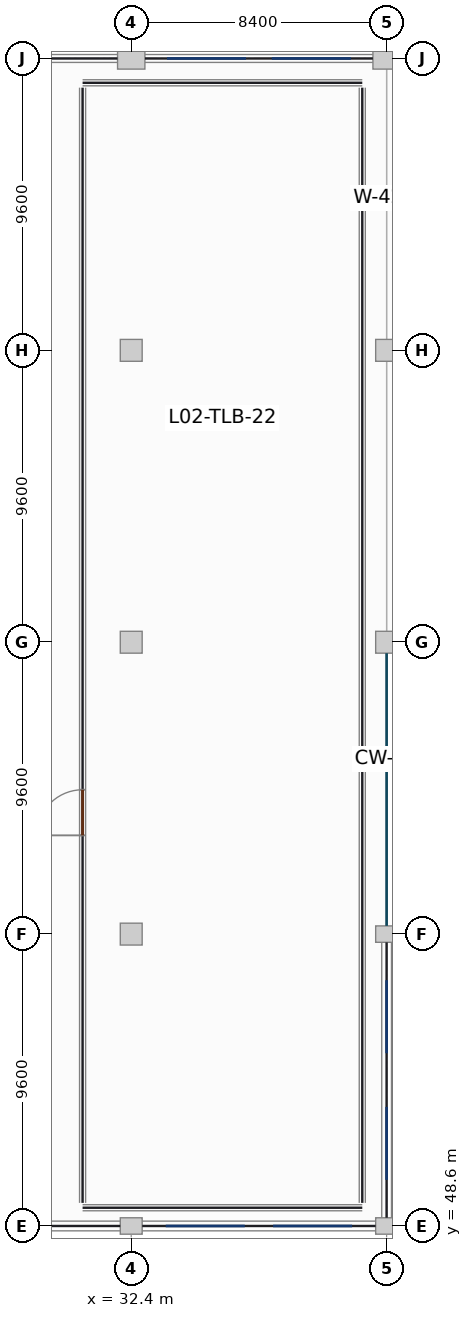
"""IFC4 building model, lengths in metres.
Left out: names, types, materials, properties, quantities, classifications, styles, units other than length and angle.
Written with IfcOpenShell. Run it as: python <this file> out.ifc"""

import sys

from ifc_helpers import new_model, si_unit, direction, frame, frame_2d, origin, origin_2d, place, context, subcontext, project, spatial, rectangle, extrude, element, fill, save


model = new_model("IFC4")
c1 = context("Model", 3, precision=1e-05, world=origin(), true_north=direction((0.0, 1.0)))
c2 = subcontext(c1, "Body", "Model", "MODEL_VIEW")
j1 = project(units=[si_unit("LENGTHUNIT", "METRE"), si_unit("PLANEANGLEUNIT", "RADIAN")], contexts=[c1])
p1 = place(None, origin())
s1 = spatial("IfcSite", under=j1, at=p1, CompositionType="ELEMENT")
p2 = place(p1, origin())
s2 = spatial("IfcBuilding", under=s1, at=p2, CompositionType="ELEMENT")
p3 = place(p2, frame((0.0, 0.0, 9.9)))
s3 = spatial("IfcBuildingStorey", under=s2, at=p3, CompositionType="ELEMENT", Elevation=9.9)
p4 = place(p3, frame((32.4, 48.6, 0.0), z_axis=(0.0, 0.0, 1.0), x_axis=(1.0, 0.0, 0.0)))
e1 = element("IfcColumn", 1, at=p4, inside=s3, PredefinedType="COLUMN", context=c2, shape_type="SweptSolid", body=[
    extrude(rectangle(XDim=0.72, YDim=0.54, at=origin_2d()), origin(), (0.0, 0.0, 1.0), 3.9),
])
for number, where, z_axis, x_axis in (
    (2, (32.4, 58.2, 0.0), (0.0, 0.0, 1.0), (1.0, 0.0, 0.0)),
    (3, (32.4, 67.8, 0.0), (0.0, 0.0, 1.0), (1.0, 0.0, 0.0)),
    (4, (32.4, 77.4, 0.0), (0.0, 0.0, 1.0), (1.0, 0.0, 0.0)),
):
    element("IfcColumn", number, at=place(p3, frame(where, z_axis=z_axis, x_axis=x_axis)), inside=s3, PredefinedType="COLUMN", context=c2, shape_type="SweptSolid", body=[
        extrude(rectangle(XDim=0.72, YDim=0.72, at=origin_2d()), origin(), (0.0, 0.0, 1.0), 3.9),
    ])
p5 = place(p3, frame((32.4, 87.0, 0.0), z_axis=(0.0, 0.0, 1.0), x_axis=(1.0, 0.0, 0.0)))
e5 = element("IfcColumn", 5, at=p5, inside=s3, PredefinedType="COLUMN", context=c2, shape_type="SweptSolid", body=[
    extrude(rectangle(XDim=0.9, YDim=0.7, at=origin_2d()), origin(), (0.0, 0.0, 1.0), 3.9),
])
for number, where, z_axis, x_axis in (
    (6, (40.8, 48.6, 0.0), (0.0, 0.0, 1.0), (1.0, 0.0, 0.0)),
    (7, (40.8, 58.2, 0.0), (0.0, 0.0, 1.0), (1.0, 0.0, 0.0)),
):
    element("IfcColumn", number, at=place(p3, frame(where, z_axis=z_axis, x_axis=x_axis)), inside=s3, PredefinedType="COLUMN", context=c2, shape_type="SweptSolid", body=[
        extrude(rectangle(XDim=0.72, YDim=0.54, at=origin_2d()), origin(), (0.0, 0.0, 1.0), 3.9),
    ])
for number, where, z_axis, x_axis in (
    (8, (40.8, 67.8, 0.0), (0.0, 0.0, 1.0), (1.0, 0.0, 0.0)),
    (9, (40.8, 77.4, 0.0), (0.0, 0.0, 1.0), (1.0, 0.0, 0.0)),
):
    element("IfcColumn", number, at=place(p3, frame(where, z_axis=z_axis, x_axis=x_axis)), inside=s3, PredefinedType="COLUMN", context=c2, shape_type="SweptSolid", body=[
        extrude(rectangle(XDim=0.72, YDim=0.72, at=origin_2d()), origin(), (0.0, 0.0, 1.0), 3.9),
    ])
p6 = place(p3, frame((40.8, 87.0, 0.0), z_axis=(0.0, 0.0, 1.0), x_axis=(1.0, 0.0, 0.0)))
e10 = element("IfcColumn", 10, at=p6, inside=s3, PredefinedType="COLUMN", context=c2, shape_type="SweptSolid", body=[
    extrude(rectangle(XDim=0.9, YDim=0.7, at=origin_2d()), origin(), (0.0, 0.0, 1.0), 3.9),
])
p7 = place(p3, frame((40.8, 48.872, 0.0), z_axis=(0.0, 0.0, 1.0), x_axis=(0.0, 1.0, 0.0)))
e11 = element("IfcWall", 11, at=p7, inside=s3, PredefinedType="SOLIDWALL", context=c2, shape_type="SweptSolid", body=[
    extrude(rectangle(XDim=9.056, YDim=0.32, at=frame_2d((4.528, 0.0))), origin(), (0.0, 0.0, 1.0), 3.08),
])
p8 = place(p7, frame((1.245, 0.0, 0.85)))
e12 = element("IfcOpeningElement", 12, at=p8, cuts=e11, PredefinedType="OPENING", context=c2, shape_type="SweptSolid", body=[
    extrude(rectangle(XDim=2.4, YDim=1.95, at=frame_2d((1.2, 0.975))), frame((0.0, 0.17, 0.0), z_axis=(0.0, -1.0, 0.0), x_axis=(1.0, 0.0, 0.0)), (0.0, 0.0, 1.0), 0.34),
])
p9 = place(p7, frame((5.411, 0.0, 0.85)))
e13 = element("IfcOpeningElement", 13, at=p9, cuts=e11, PredefinedType="OPENING", context=c2, shape_type="SweptSolid", body=[
    extrude(rectangle(XDim=2.4, YDim=1.95, at=frame_2d((1.2, 0.975))), frame((0.0, 0.17, 0.0), z_axis=(0.0, -1.0, 0.0), x_axis=(1.0, 0.0, 0.0)), (0.0, 0.0, 1.0), 0.34),
])
p10 = place(p3, frame((24.362, 48.6, 0.0), z_axis=(0.0, 0.0, 1.0), x_axis=(1.0, 0.0, 0.0)))
e14 = element("IfcWall", 14, at=p10, inside=s3, PredefinedType="SOLIDWALL", context=c2, shape_type="SweptSolid", body=[
    extrude(rectangle(XDim=7.676, YDim=0.32, at=frame_2d((3.838, 0.0))), origin(), (0.0, 0.0, 1.0), 3.08),
])
p11 = place(p10, frame((1.142, 0.0, 0.85)))
e15 = element("IfcOpeningElement", 15, at=p11, cuts=e14, PredefinedType="OPENING", context=c2, shape_type="SweptSolid", body=[
    extrude(rectangle(XDim=1.4, YDim=1.65, at=frame_2d((0.7, 0.825))), frame((0.0, 0.17, 0.0), z_axis=(0.0, -1.0, 0.0), x_axis=(1.0, 0.0, 0.0)), (0.0, 0.0, 1.0), 0.34),
])
p12 = place(p3, frame((32.762, 48.6, 0.0), z_axis=(0.0, 0.0, 1.0), x_axis=(1.0, 0.0, 0.0)))
e16 = element("IfcWall", 16, at=p12, inside=s3, PredefinedType="SOLIDWALL", context=c2, shape_type="SweptSolid", body=[
    extrude(rectangle(XDim=7.676, YDim=0.32, at=frame_2d((3.838, 0.0))), origin(), (0.0, 0.0, 1.0), 3.08),
])
p13 = place(p12, frame((0.772, 0.0, 0.85)))
e17 = element("IfcOpeningElement", 17, at=p13, cuts=e16, PredefinedType="OPENING", context=c2, shape_type="SweptSolid", body=[
    extrude(rectangle(XDim=2.6, YDim=1.95, at=frame_2d((1.3, 0.975))), frame((0.0, 0.17, 0.0), z_axis=(0.0, -1.0, 0.0), x_axis=(1.0, 0.0, 0.0)), (0.0, 0.0, 1.0), 0.34),
])
p14 = place(p12, frame((4.303, 0.0, 0.85)))
e18 = element("IfcOpeningElement", 18, at=p14, cuts=e16, PredefinedType="OPENING", context=c2, shape_type="SweptSolid", body=[
    extrude(rectangle(XDim=2.6, YDim=1.95, at=frame_2d((1.3, 0.975))), frame((0.0, 0.17, 0.0), z_axis=(0.0, -1.0, 0.0), x_axis=(1.0, 0.0, 0.0)), (0.0, 0.0, 1.0), 0.34),
])
p15 = place(p3, frame((24.452, 87.0, 0.0), z_axis=(0.0, 0.0, 1.0), x_axis=(1.0, 0.0, 0.0)))
e19 = element("IfcWall", 19, at=p15, inside=s3, PredefinedType="SOLIDWALL", context=c2, shape_type="SweptSolid", body=[
    extrude(rectangle(XDim=7.496, YDim=0.26, at=frame_2d((3.748, 0.0))), origin(), (0.0, 0.0, 1.0), 3.08),
])
p16 = place(p15, frame((0.724, 0.0, 0.85)))
e20 = element("IfcOpeningElement", 20, at=p16, cuts=e19, PredefinedType="OPENING", context=c2, shape_type="SweptSolid", body=[
    extrude(rectangle(XDim=2.6, YDim=1.95, at=frame_2d((1.3, 0.975))), frame((0.0, 0.14, 0.0), z_axis=(0.0, -1.0, 0.0), x_axis=(1.0, 0.0, 0.0)), (0.0, 0.0, 1.0), 0.28),
])
p17 = place(p3, frame((32.852, 87.0, 0.0), z_axis=(0.0, 0.0, 1.0), x_axis=(1.0, 0.0, 0.0)))
e21 = element("IfcWall", 21, at=p17, inside=s3, PredefinedType="SOLIDWALL", context=c2, shape_type="SweptSolid", body=[
    extrude(rectangle(XDim=7.496, YDim=0.26, at=frame_2d((3.748, 0.0))), origin(), (0.0, 0.0, 1.0), 3.08),
])
p18 = place(p17, frame((0.724, 0.0, 0.85)))
e22 = element("IfcOpeningElement", 22, at=p18, cuts=e21, PredefinedType="OPENING", context=c2, shape_type="SweptSolid", body=[
    extrude(rectangle(XDim=2.6, YDim=1.95, at=frame_2d((1.3, 0.975))), frame((0.0, 0.14, 0.0), z_axis=(0.0, -1.0, 0.0), x_axis=(1.0, 0.0, 0.0)), (0.0, 0.0, 1.0), 0.28),
])
p19 = place(p17, frame((4.172, 0.0, 0.85)))
e23 = element("IfcOpeningElement", 23, at=p19, cuts=e21, PredefinedType="OPENING", context=c2, shape_type="SweptSolid", body=[
    extrude(rectangle(XDim=2.6, YDim=1.95, at=frame_2d((1.3, 0.975))), frame((0.0, 0.14, 0.0), z_axis=(0.0, -1.0, 0.0), x_axis=(1.0, 0.0, 0.0)), (0.0, 0.0, 1.0), 0.28),
])
for number, where, z_axis, x_axis in (
    (24, (30.8, 49.2, 0.0), (0.0, 0.0, 1.0), (1.0, 0.0, 0.0)),
    (25, (30.8, 86.2, 0.0), (0.0, 0.0, 1.0), (1.0, 0.0, 0.0)),
):
    element("IfcWall", number, at=place(p3, frame(where, z_axis=z_axis, x_axis=x_axis)), inside=s3, PredefinedType="PARTITIONING", context=c2, shape_type="SweptSolid", body=[
        extrude(rectangle(XDim=9.2, YDim=0.2, at=frame_2d((4.6, 0.0))), origin(), (0.0, 0.0, 1.0), 2.92),
    ])
p20 = place(p3, frame((30.8, 49.36, 0.0), z_axis=(0.0, 0.0, 1.0), x_axis=(0.0, 1.0, 0.0)))
e26 = element("IfcWall", 26, at=p20, inside=s3, PredefinedType="PARTITIONING", context=c2, shape_type="SweptSolid", body=[
    extrude(rectangle(XDim=36.68, YDim=0.2, at=frame_2d((18.34, 0.0))), origin(), (0.0, 0.0, 1.0), 2.92),
])
p21 = place(p20, frame((12.088, 0.0, 0.0)))
e27 = element("IfcOpeningElement", 27, at=p21, cuts=e26, PredefinedType="OPENING", context=c2, shape_type="SweptSolid", body=[
    extrude(rectangle(XDim=1.5, YDim=2.2, at=frame_2d((0.75, 1.1))), frame((0.0, 0.11, 0.0), z_axis=(0.0, -1.0, 0.0), x_axis=(1.0, 0.0, 0.0)), (0.0, 0.0, 1.0), 0.22),
])
p22 = place(p3, frame((40.0, 49.36, 0.0), z_axis=(0.0, 0.0, 1.0), x_axis=(0.0, 1.0, 0.0)))
e28 = element("IfcWall", 28, at=p22, inside=s3, PredefinedType="PARTITIONING", context=c2, shape_type="SweptSolid", body=[
    extrude(rectangle(XDim=36.68, YDim=0.2, at=frame_2d((18.34, 0.0))), origin(), (0.0, 0.0, 1.0), 2.92),
])
p23 = place(p8, origin())
e29 = element("IfcWindow", 29, at=p23, inside=s3, PartitioningType="SINGLE_PANEL", PredefinedType="WINDOW", context=c2, shape_type="SweptSolid", body=[
    extrude(rectangle(XDim=2.4, YDim=1.95, at=frame_2d((1.2, 0.975))), frame((0.0, 0.03, 0.0), z_axis=(0.0, -1.0, 0.0), x_axis=(1.0, 0.0, 0.0)), (0.0, 0.0, 1.0), 0.06),
])
fill(e12, e29)
p24 = place(p9, origin())
e30 = element("IfcWindow", 30, at=p24, inside=s3, PartitioningType="SINGLE_PANEL", PredefinedType="WINDOW", context=c2, shape_type="SweptSolid", body=[
    extrude(rectangle(XDim=2.4, YDim=1.95, at=frame_2d((1.2, 0.975))), frame((0.0, 0.03, 0.0), z_axis=(0.0, -1.0, 0.0), x_axis=(1.0, 0.0, 0.0)), (0.0, 0.0, 1.0), 0.06),
])
fill(e13, e30)
p25 = place(p13, origin())
e31 = element("IfcWindow", 31, at=p25, inside=s3, PartitioningType="SINGLE_PANEL", PredefinedType="WINDOW", context=c2, shape_type="SweptSolid", body=[
    extrude(rectangle(XDim=2.6, YDim=1.95, at=frame_2d((1.3, 0.975))), frame((0.0, 0.03, 0.0), z_axis=(0.0, -1.0, 0.0), x_axis=(1.0, 0.0, 0.0)), (0.0, 0.0, 1.0), 0.06),
])
fill(e17, e31)
p26 = place(p14, origin())
e32 = element("IfcWindow", 32, at=p26, inside=s3, PartitioningType="SINGLE_PANEL", PredefinedType="WINDOW", context=c2, shape_type="SweptSolid", body=[
    extrude(rectangle(XDim=2.6, YDim=1.95, at=frame_2d((1.3, 0.975))), frame((0.0, 0.03, 0.0), z_axis=(0.0, -1.0, 0.0), x_axis=(1.0, 0.0, 0.0)), (0.0, 0.0, 1.0), 0.06),
])
fill(e18, e32)
p27 = place(p18, origin())
e33 = element("IfcWindow", 33, at=p27, inside=s3, PartitioningType="SINGLE_PANEL", PredefinedType="WINDOW", context=c2, shape_type="SweptSolid", body=[
    extrude(rectangle(XDim=2.6, YDim=1.95, at=frame_2d((1.3, 0.975))), frame((0.0, 0.03, 0.0), z_axis=(0.0, -1.0, 0.0), x_axis=(1.0, 0.0, 0.0)), (0.0, 0.0, 1.0), 0.06),
])
fill(e22, e33)
p28 = place(p19, origin())
e34 = element("IfcWindow", 34, at=p28, inside=s3, PartitioningType="SINGLE_PANEL", PredefinedType="WINDOW", context=c2, shape_type="SweptSolid", body=[
    extrude(rectangle(XDim=2.6, YDim=1.95, at=frame_2d((1.3, 0.975))), frame((0.0, 0.03, 0.0), z_axis=(0.0, -1.0, 0.0), x_axis=(1.0, 0.0, 0.0)), (0.0, 0.0, 1.0), 0.06),
])
fill(e23, e34)
p29 = place(p21, origin())
e35 = element("IfcDoor", 35, at=p29, inside=s3, OperationType="SINGLE_SWING_LEFT", PredefinedType="DOOR", context=c2, shape_type="SweptSolid", body=[
    extrude(rectangle(XDim=1.5, YDim=2.2, at=frame_2d((0.75, 1.1))), frame((0.0, 0.025, 0.0), z_axis=(0.0, -1.0, 0.0), x_axis=(1.0, 0.0, 0.0)), (0.0, 0.0, 1.0), 0.05),
])
fill(e27, e35)
save(model, sys.argv[1])
